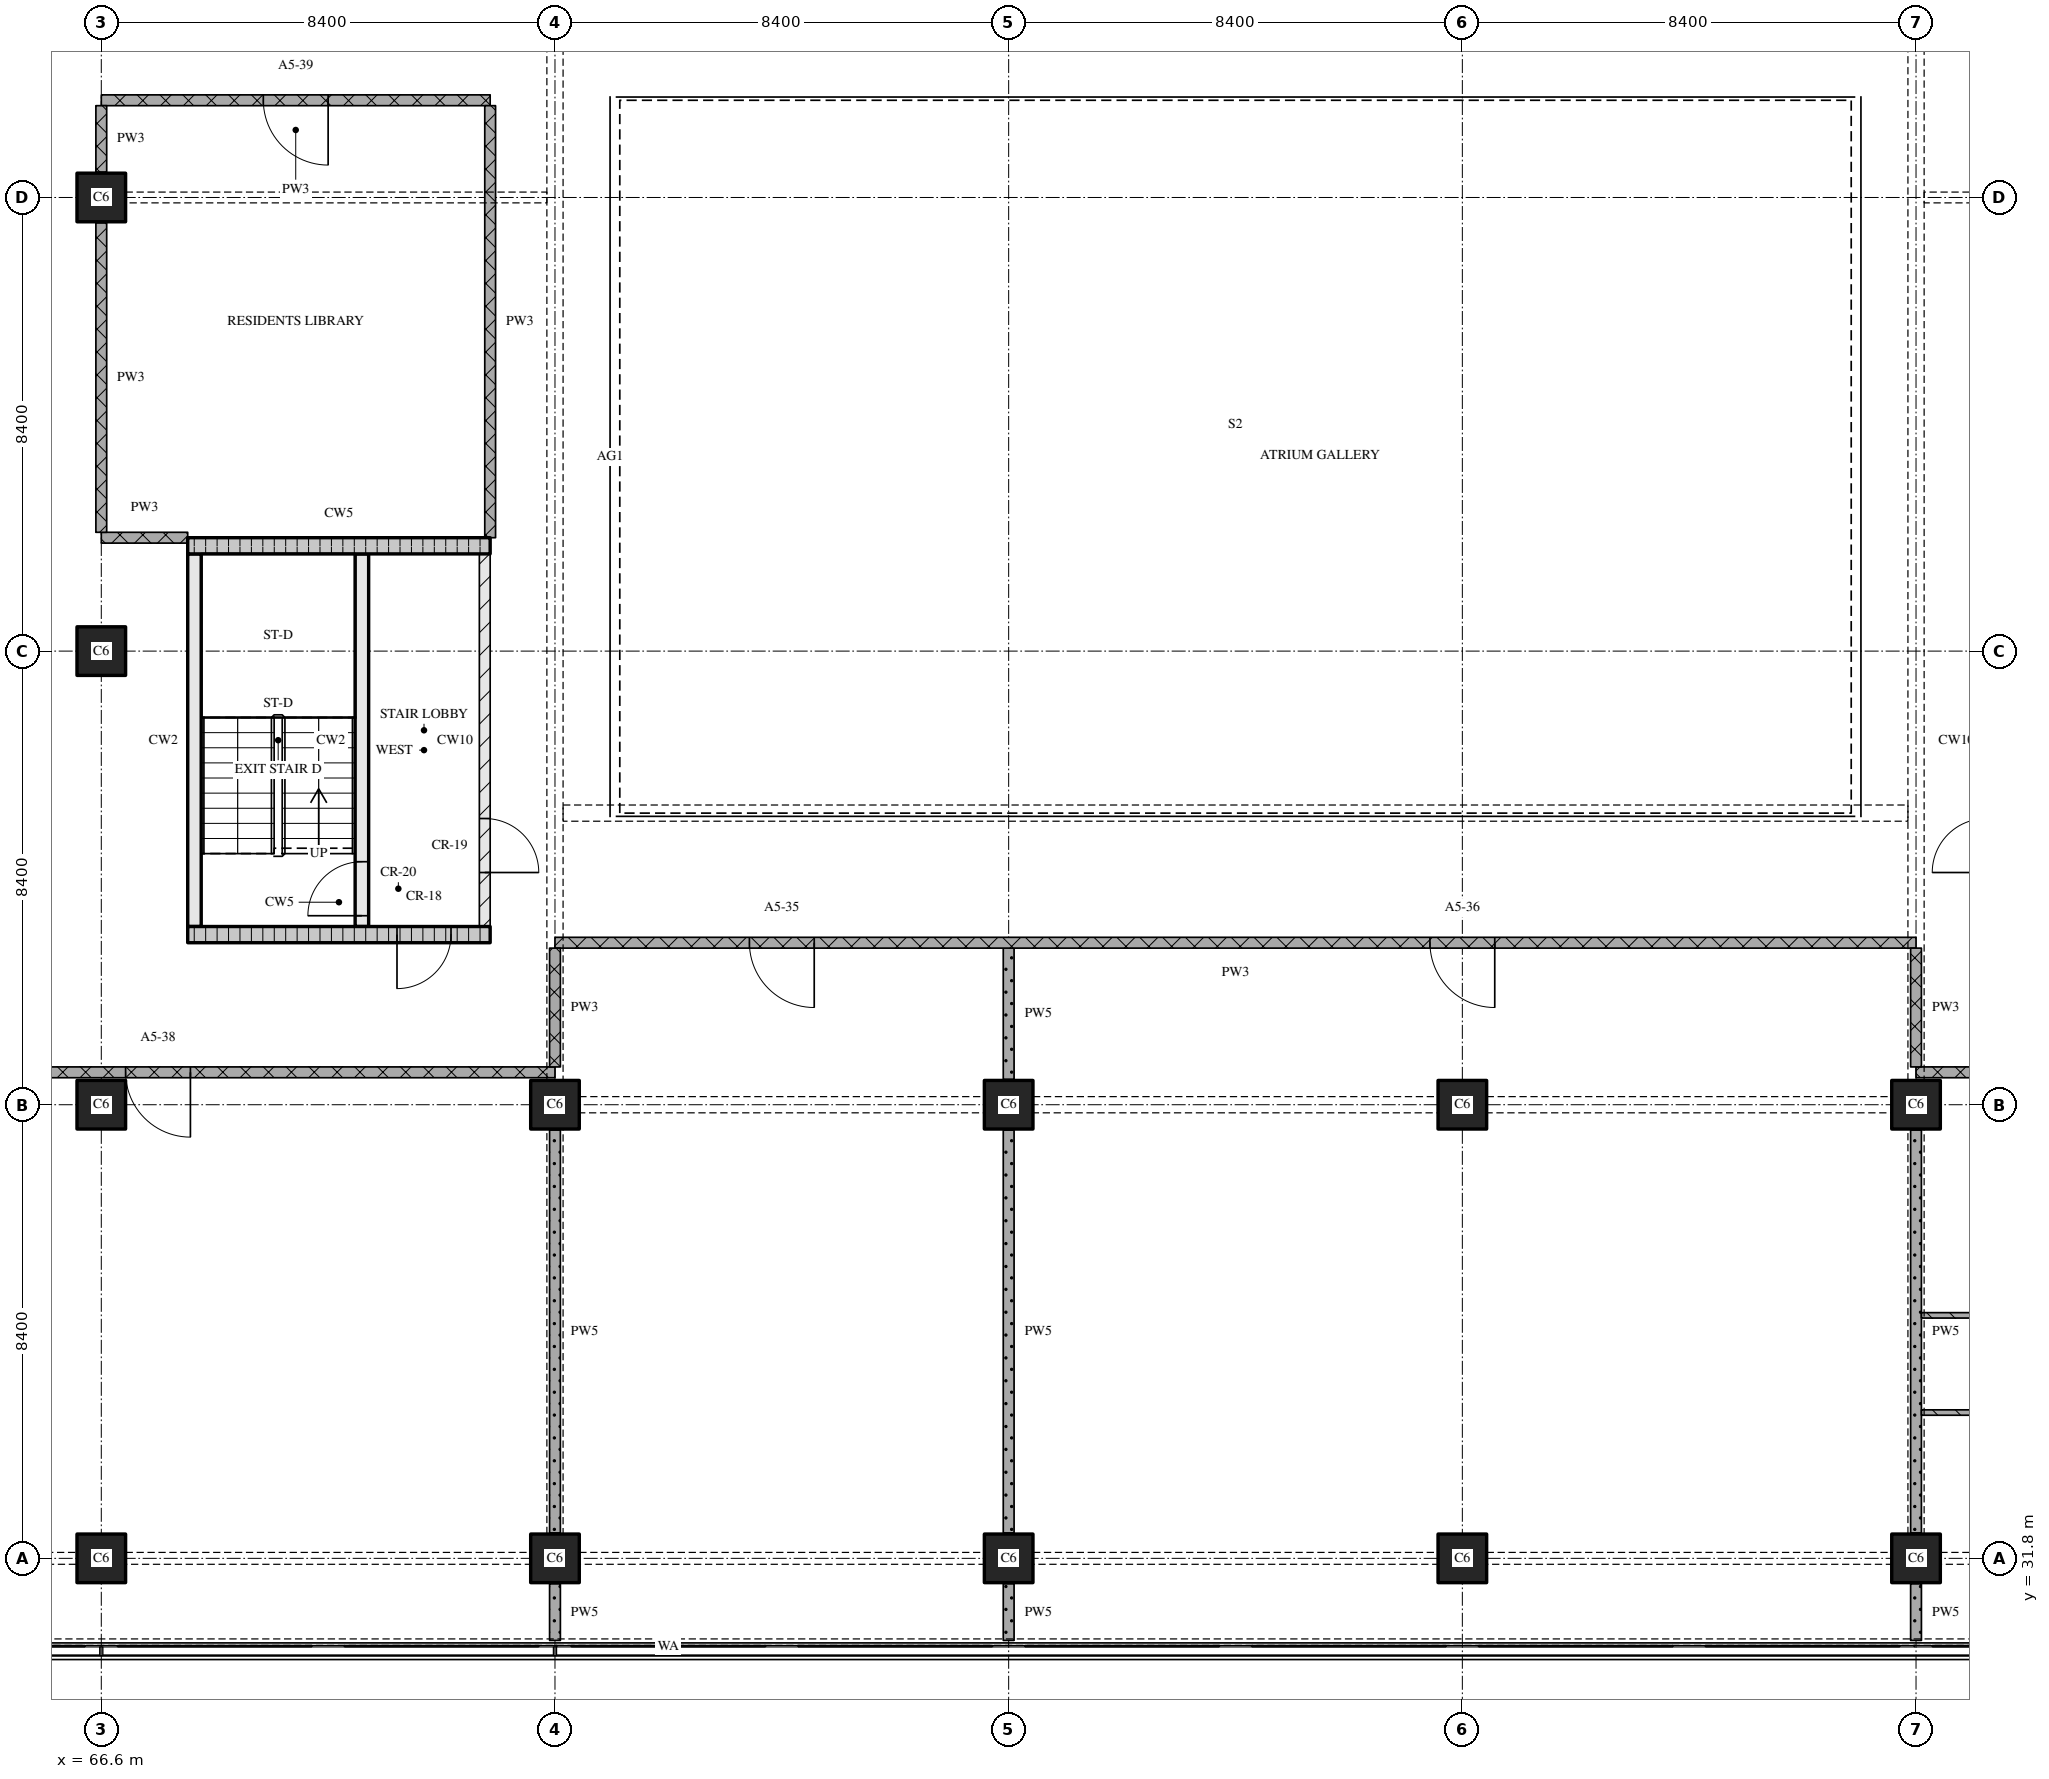
"""IFC4 building model, lengths in metres.
Left out: names, types, materials, properties, quantities, classifications, styles, units other than length and angle.
Written with IfcOpenShell. Run it as: python <this file> out.ifc"""

import sys

from ifc_helpers import new_model, si_unit, direction, frame, frame_2d, origin, origin_2d, place, context, subcontext, project, spatial, rectangle, extrude, element, fill, save


model = new_model("IFC4")
c1 = context("Model", 3, precision=1e-05, world=origin(), true_north=direction((0.0, 1.0)))
c2 = subcontext(c1, "Body", "Model", "MODEL_VIEW")
j1 = project(units=[si_unit("LENGTHUNIT", "METRE"), si_unit("PLANEANGLEUNIT", "RADIAN")], contexts=[c1])
p1 = place(None, origin())
s1 = spatial("IfcSite", under=j1, at=p1, CompositionType="ELEMENT")
p2 = place(p1, origin())
s2 = spatial("IfcBuilding", under=s1, at=p2, CompositionType="ELEMENT")
p3 = place(p2, frame((0.0, 0.0, 80.4)))
s3 = spatial("IfcBuildingStorey", under=s2, at=p3, CompositionType="ELEMENT", Elevation=80.4)
for number, where, z_axis, x_axis in (
    (1, (66.6, 31.8, 0.0), (0.0, 0.0, 1.0), (1.0, 0.0, 0.0)),
    (2, (66.6, 40.2, 0.0), (0.0, 0.0, 1.0), (1.0, 0.0, 0.0)),
    (3, (66.6, 48.6, 0.0), (0.0, 0.0, 1.0), (1.0, 0.0, 0.0)),
    (4, (66.6, 57.0, 0.0), (0.0, 0.0, 1.0), (1.0, 0.0, 0.0)),
    (5, (75.0, 31.8, 0.0), (0.0, 0.0, 1.0), (1.0, 0.0, 0.0)),
    (6, (75.0, 40.2, 0.0), (0.0, 0.0, 1.0), (1.0, 0.0, 0.0)),
    (7, (83.4, 31.8, 0.0), (0.0, 0.0, 1.0), (1.0, 0.0, 0.0)),
    (8, (83.4, 40.2, 0.0), (0.0, 0.0, 1.0), (1.0, 0.0, 0.0)),
    (9, (91.8, 31.8, 0.0), (0.0, 0.0, 1.0), (1.0, 0.0, 0.0)),
    (10, (91.8, 40.2, 0.0), (0.0, 0.0, 1.0), (1.0, 0.0, 0.0)),
    (11, (100.2, 31.8, 0.0), (0.0, 0.0, 1.0), (1.0, 0.0, 0.0)),
    (12, (100.2, 40.2, 0.0), (0.0, 0.0, 1.0), (1.0, 0.0, 0.0)),
):
    element("IfcColumn", number, at=place(p3, frame(where, z_axis=z_axis, x_axis=x_axis)), inside=s3, PredefinedType="COLUMN", context=c2, shape_type="SweptSolid", body=[
        extrude(rectangle(XDim=0.9, YDim=0.9, at=origin_2d()), origin(), (0.0, 0.0, 1.0), 3.6),
    ])
p4 = place(p3, frame((68.2, 43.35, 0.0), z_axis=(0.0, 0.0, 1.0), x_axis=(1.0, 0.0, 0.0)))
e13 = element("IfcWall", 13, at=p4, inside=s3, PredefinedType="SOLIDWALL", context=c2, shape_type="SweptSolid", body=[
    extrude(rectangle(XDim=5.6, YDim=0.3, at=frame_2d((2.8, 0.0))), origin(), (0.0, 0.0, 1.0), 3.3),
])
p5 = place(p4, frame((3.875, 0.0, 0.0)))
e14 = element("IfcOpeningElement", 14, at=p5, cuts=e13, PredefinedType="OPENING", context=c2, shape_type="SweptSolid", body=[
    extrude(rectangle(XDim=1.0, YDim=2.1, at=frame_2d((0.5, 1.05))), frame((0.0, 0.16, 0.0), z_axis=(0.0, -1.0, 0.0), x_axis=(1.0, 0.0, 0.0)), (0.0, 0.0, 1.0), 0.32),
])
p6 = place(p3, frame((68.325, 43.5, 0.0), z_axis=(0.0, 0.0, 1.0), x_axis=(0.0, 1.0, 0.0)))
e15 = element("IfcWall", 15, at=p6, inside=s3, PredefinedType="SOLIDWALL", context=c2, shape_type="SweptSolid", body=[
    extrude(rectangle(XDim=6.9, YDim=0.25, at=frame_2d((3.45, 0.0))), origin(), (0.0, 0.0, 1.0), 3.3),
])
p7 = place(p3, frame((71.425, 43.5, 0.0), z_axis=(0.0, 0.0, 1.0), x_axis=(0.0, 1.0, 0.0)))
e16 = element("IfcWall", 16, at=p7, inside=s3, PredefinedType="SOLIDWALL", context=c2, shape_type="SweptSolid", body=[
    extrude(rectangle(XDim=6.9, YDim=0.25, at=frame_2d((3.45, 0.0))), origin(), (0.0, 0.0, 1.0), 3.3),
])
p8 = place(p7, frame((0.2, 0.0, 0.0)))
e17 = element("IfcOpeningElement", 17, at=p8, cuts=e16, PredefinedType="OPENING", context=c2, shape_type="SweptSolid", body=[
    extrude(rectangle(XDim=1.0, YDim=2.1, at=frame_2d((0.5, 1.05))), frame((0.0, 0.135, 0.0), z_axis=(0.0, -1.0, 0.0), x_axis=(1.0, 0.0, 0.0)), (0.0, 0.0, 1.0), 0.27),
])
p9 = place(p3, frame((73.7, 43.5, 0.0), z_axis=(0.0, 0.0, 1.0), x_axis=(0.0, 1.0, 0.0)))
e18 = element("IfcWall", 18, at=p9, inside=s3, PredefinedType="PARTITIONING", context=c2, shape_type="SweptSolid", body=[
    extrude(rectangle(XDim=6.9, YDim=0.2, at=frame_2d((3.45, 0.0))), origin(), (0.0, 0.0, 1.0), 3.3),
])
p10 = place(p9, frame((1.0, 0.0, 0.0)))
e19 = element("IfcOpeningElement", 19, at=p10, cuts=e18, PredefinedType="OPENING", context=c2, shape_type="SweptSolid", body=[
    extrude(rectangle(XDim=1.0, YDim=2.1, at=frame_2d((0.5, 1.05))), frame((0.0, 0.11, 0.0), z_axis=(0.0, -1.0, 0.0), x_axis=(1.0, 0.0, 0.0)), (0.0, 0.0, 1.0), 0.22),
])
p11 = place(p3, frame((68.2, 50.55, 0.0), z_axis=(0.0, 0.0, 1.0), x_axis=(1.0, 0.0, 0.0)))
e20 = element("IfcWall", 20, at=p11, inside=s3, PredefinedType="SOLIDWALL", context=c2, shape_type="SweptSolid", body=[
    extrude(rectangle(XDim=5.6, YDim=0.3, at=frame_2d((2.8, 0.0))), origin(), (0.0, 0.0, 1.0), 3.3),
])
p12 = place(p3, frame((100.3, 34.5, 0.0), z_axis=(0.0, 0.0, 1.0), x_axis=(1.0, 0.0, 0.0)))
e21 = element("IfcWall", 21, at=p12, inside=s3, PredefinedType="PARTITIONING", context=c2, shape_type="SweptSolid", body=[
    extrude(rectangle(XDim=4.1, YDim=0.1, at=frame_2d((2.05, 0.0))), origin(), (0.0, 0.0, 1.0), 3.3),
])
p13 = place(p3, frame((100.3, 36.3, 0.0), z_axis=(0.0, 0.0, 1.0), x_axis=(1.0, 0.0, 0.0)))
e22 = element("IfcWall", 22, at=p13, inside=s3, PredefinedType="PARTITIONING", context=c2, shape_type="SweptSolid", body=[
    extrude(rectangle(XDim=11.0, YDim=0.1, at=frame_2d((5.5, 0.0))), origin(), (0.0, 0.0, 1.0), 3.3),
])
p14 = place(p13, frame((1.75, 0.0, 0.0)))
e23 = element("IfcOpeningElement", 23, at=p14, cuts=e22, PredefinedType="OPENING", context=c2, shape_type="SweptSolid", body=[
    extrude(rectangle(XDim=0.8, YDim=2.1, at=frame_2d((0.4, 1.05))), frame((0.0, 0.06, 0.0), z_axis=(0.0, -1.0, 0.0), x_axis=(1.0, 0.0, 0.0)), (0.0, 0.0, 1.0), 0.12),
])
p15 = place(p13, frame((6.25, 0.0, 0.0)))
e24 = element("IfcOpeningElement", 24, at=p15, cuts=e22, PredefinedType="OPENING", context=c2, shape_type="SweptSolid", body=[
    extrude(rectangle(XDim=0.8, YDim=2.1, at=frame_2d((0.4, 1.05))), frame((0.0, 0.06, 0.0), z_axis=(0.0, -1.0, 0.0), x_axis=(1.0, 0.0, 0.0)), (0.0, 0.0, 1.0), 0.12),
])
p16 = place(p3, frame((75.0, 40.8, 0.0), z_axis=(0.0, 0.0, 1.0), x_axis=(-1.0, 0.0, 0.0)))
e25 = element("IfcWall", 25, at=p16, inside=s3, PredefinedType="PARTITIONING", context=c2, shape_type="SweptSolid", body=[
    extrude(rectangle(XDim=24.08, YDim=0.2, at=frame_2d((12.04, 0.0))), origin(), (0.0, 0.0, 1.0), 3.3),
])
p17 = place(p16, frame((6.75, 0.0, 0.0)))
e26 = element("IfcOpeningElement", 26, at=p17, cuts=e25, PredefinedType="OPENING", context=c2, shape_type="SweptSolid", body=[
    extrude(rectangle(XDim=1.2, YDim=2.1, at=frame_2d((0.6, 1.05))), frame((0.0, 0.11, 0.0), z_axis=(0.0, -1.0, 0.0), x_axis=(1.0, 0.0, 0.0)), (0.0, 0.0, 1.0), 0.22),
])
p18 = place(p16, frame((20.728, 0.0, 0.0)))
e27 = element("IfcOpeningElement", 27, at=p18, cuts=e25, PredefinedType="OPENING", context=c2, shape_type="SweptSolid", body=[
    extrude(rectangle(XDim=1.2, YDim=2.1, at=frame_2d((0.6, 1.05))), frame((0.0, 0.11, 0.0), z_axis=(0.0, -1.0, 0.0), x_axis=(1.0, 0.0, 0.0)), (0.0, 0.0, 1.0), 0.22),
])
p19 = place(p3, frame((124.28, 40.8, 0.0), z_axis=(0.0, 0.0, 1.0), x_axis=(-1.0, 0.0, 0.0)))
e28 = element("IfcWall", 28, at=p19, inside=s3, PredefinedType="PARTITIONING", context=c2, shape_type="SweptSolid", body=[
    extrude(rectangle(XDim=24.08, YDim=0.2, at=frame_2d((12.04, 0.0))), origin(), (0.0, 0.0, 1.0), 3.3),
])
p20 = place(p19, frame((11.73, 0.0, 0.0)))
e29 = element("IfcOpeningElement", 29, at=p20, cuts=e28, PredefinedType="OPENING", context=c2, shape_type="SweptSolid", body=[
    extrude(rectangle(XDim=1.0, YDim=2.1, at=frame_2d((0.5, 1.05))), frame((0.0, 0.11, 0.0), z_axis=(0.0, -1.0, 0.0), x_axis=(1.0, 0.0, 0.0)), (0.0, 0.0, 1.0), 0.22),
])
p21 = place(p3, frame((100.2, 43.2, 0.0), z_axis=(0.0, 0.0, 1.0), x_axis=(-1.0, 0.0, 0.0)))
e30 = element("IfcWall", 30, at=p21, inside=s3, PredefinedType="PARTITIONING", context=c2, shape_type="SweptSolid", body=[
    extrude(rectangle(XDim=25.2, YDim=0.2, at=frame_2d((12.6, 0.0))), origin(), (0.0, 0.0, 1.0), 3.3),
])
p22 = place(p21, frame((7.8, 0.0, 0.0)))
e31 = element("IfcOpeningElement", 31, at=p22, cuts=e30, PredefinedType="OPENING", context=c2, shape_type="SweptSolid", body=[
    extrude(rectangle(XDim=1.2, YDim=2.1, at=frame_2d((0.6, 1.05))), frame((0.0, 0.11, 0.0), z_axis=(0.0, -1.0, 0.0), x_axis=(1.0, 0.0, 0.0)), (0.0, 0.0, 1.0), 0.22),
])
p23 = place(p21, frame((20.4, 0.0, 0.0)))
e32 = element("IfcOpeningElement", 32, at=p23, cuts=e30, PredefinedType="OPENING", context=c2, shape_type="SweptSolid", body=[
    extrude(rectangle(XDim=1.2, YDim=2.1, at=frame_2d((0.6, 1.05))), frame((0.0, 0.11, 0.0), z_axis=(0.0, -1.0, 0.0), x_axis=(1.0, 0.0, 0.0)), (0.0, 0.0, 1.0), 0.22),
])
p24 = place(p3, frame((66.6, 50.7, 0.0), z_axis=(0.0, 0.0, 1.0), x_axis=(1.0, 0.0, 0.0)))
e33 = element("IfcWall", 33, at=p24, inside=s3, PredefinedType="PARTITIONING", context=c2, shape_type="SweptSolid", body=[
    extrude(rectangle(XDim=1.6, YDim=0.2, at=frame_2d((0.8, 0.0))), origin(), (0.0, 0.0, 1.0), 3.3),
])
p25 = place(p3, frame((73.8, 58.8, 0.0), z_axis=(0.0, 0.0, 1.0), x_axis=(-1.0, 0.0, 0.0)))
e34 = element("IfcWall", 34, at=p25, inside=s3, PredefinedType="PARTITIONING", context=c2, shape_type="SweptSolid", body=[
    extrude(rectangle(XDim=7.2, YDim=0.2, at=frame_2d((3.6, 0.0))), origin(), (0.0, 0.0, 1.0), 3.3),
])
p26 = place(p25, frame((3.0, 0.0, 0.0)))
e35 = element("IfcOpeningElement", 35, at=p26, cuts=e34, PredefinedType="OPENING", context=c2, shape_type="SweptSolid", body=[
    extrude(rectangle(XDim=1.2, YDim=2.1, at=frame_2d((0.6, 1.05))), frame((0.0, 0.11, 0.0), z_axis=(0.0, -1.0, 0.0), x_axis=(1.0, 0.0, 0.0)), (0.0, 0.0, 1.0), 0.22),
])
p27 = place(p3, frame((66.6, 56.53, 0.0), z_axis=(0.0, 0.0, 1.0), x_axis=(0.0, -1.0, 0.0)))
e36 = element("IfcWall", 36, at=p27, inside=s3, PredefinedType="PARTITIONING", context=c2, shape_type="SweptSolid", body=[
    extrude(rectangle(XDim=5.73, YDim=0.2, at=frame_2d((2.865, 0.0))), origin(), (0.0, 0.0, 1.0), 3.3),
])
p28 = place(p3, frame((66.6, 58.7, 0.0), z_axis=(0.0, 0.0, 1.0), x_axis=(0.0, -1.0, 0.0)))
e37 = element("IfcWall", 37, at=p28, inside=s3, PredefinedType="PARTITIONING", context=c2, shape_type="SweptSolid", body=[
    extrude(rectangle(XDim=1.23, YDim=0.2, at=frame_2d((0.615, 0.0))), origin(), (0.0, 0.0, 1.0), 3.3),
])
p29 = place(p3, frame((73.8, 58.7, 0.0), z_axis=(0.0, 0.0, 1.0), x_axis=(0.0, -1.0, 0.0)))
e38 = element("IfcWall", 38, at=p29, inside=s3, PredefinedType="PARTITIONING", context=c2, shape_type="SweptSolid", body=[
    extrude(rectangle(XDim=8.0, YDim=0.2, at=frame_2d((4.0, 0.0))), origin(), (0.0, 0.0, 1.0), 3.3),
])
p30 = place(p3, frame((75.0, 43.1, 0.0), z_axis=(0.0, 0.0, 1.0), x_axis=(0.0, -1.0, 0.0)))
e39 = element("IfcWall", 39, at=p30, inside=s3, PredefinedType="PARTITIONING", context=c2, shape_type="SweptSolid", body=[
    extrude(rectangle(XDim=2.2, YDim=0.2, at=frame_2d((1.1, 0.0))), origin(), (0.0, 0.0, 1.0), 2.41),
])
p31 = place(p3, frame((75.0, 31.33, 0.0), z_axis=(0.0, 0.0, 1.0), x_axis=(0.0, -1.0, 0.0)))
e40 = element("IfcWall", 40, at=p31, inside=s3, PredefinedType="PARTITIONING", context=c2, shape_type="SweptSolid", body=[
    extrude(rectangle(XDim=1.05, YDim=0.2, at=frame_2d((0.525, 0.0))), origin(), (0.0, 0.0, 1.0), 2.41),
])
p32 = place(p3, frame((75.0, 39.73, 0.0), z_axis=(0.0, 0.0, 1.0), x_axis=(0.0, -1.0, 0.0)))
e41 = element("IfcWall", 41, at=p32, inside=s3, PredefinedType="PARTITIONING", context=c2, shape_type="SweptSolid", body=[
    extrude(rectangle(XDim=7.46, YDim=0.2, at=frame_2d((3.73, 0.0))), origin(), (0.0, 0.0, 1.0), 2.81),
])
p33 = place(p3, frame((83.4, 31.33, 0.0), z_axis=(0.0, 0.0, 1.0), x_axis=(0.0, -1.0, 0.0)))
e42 = element("IfcWall", 42, at=p33, inside=s3, PredefinedType="PARTITIONING", context=c2, shape_type="SweptSolid", body=[
    extrude(rectangle(XDim=1.05, YDim=0.2, at=frame_2d((0.525, 0.0))), origin(), (0.0, 0.0, 1.0), 3.3),
])
p34 = place(p3, frame((83.4, 39.73, 0.0), z_axis=(0.0, 0.0, 1.0), x_axis=(0.0, -1.0, 0.0)))
e43 = element("IfcWall", 43, at=p34, inside=s3, PredefinedType="PARTITIONING", context=c2, shape_type="SweptSolid", body=[
    extrude(rectangle(XDim=7.46, YDim=0.2, at=frame_2d((3.73, 0.0))), origin(), (0.0, 0.0, 1.0), 3.3),
])
p35 = place(p3, frame((83.4, 43.1, 0.0), z_axis=(0.0, 0.0, 1.0), x_axis=(0.0, -1.0, 0.0)))
e44 = element("IfcWall", 44, at=p35, inside=s3, PredefinedType="PARTITIONING", context=c2, shape_type="SweptSolid", body=[
    extrude(rectangle(XDim=2.43, YDim=0.2, at=frame_2d((1.215, 0.0))), origin(), (0.0, 0.0, 1.0), 3.3),
])
p36 = place(p3, frame((100.2, 43.1, 0.0), z_axis=(0.0, 0.0, 1.0), x_axis=(0.0, -1.0, 0.0)))
e45 = element("IfcWall", 45, at=p36, inside=s3, PredefinedType="PARTITIONING", context=c2, shape_type="SweptSolid", body=[
    extrude(rectangle(XDim=2.2, YDim=0.2, at=frame_2d((1.1, 0.0))), origin(), (0.0, 0.0, 1.0), 2.41),
])
p37 = place(p3, frame((100.2, 31.33, 0.0), z_axis=(0.0, 0.0, 1.0), x_axis=(0.0, -1.0, 0.0)))
e46 = element("IfcWall", 46, at=p37, inside=s3, PredefinedType="PARTITIONING", context=c2, shape_type="SweptSolid", body=[
    extrude(rectangle(XDim=1.05, YDim=0.2, at=frame_2d((0.525, 0.0))), origin(), (0.0, 0.0, 1.0), 2.41),
])
p38 = place(p3, frame((100.2, 39.73, 0.0), z_axis=(0.0, 0.0, 1.0), x_axis=(0.0, -1.0, 0.0)))
e47 = element("IfcWall", 47, at=p38, inside=s3, PredefinedType="PARTITIONING", context=c2, shape_type="SweptSolid", body=[
    extrude(rectangle(XDim=7.46, YDim=0.2, at=frame_2d((3.73, 0.0))), origin(), (0.0, 0.0, 1.0), 2.81),
])
p39 = place(p5, origin())
e48 = element("IfcDoor", 48, at=p39, inside=s3, OperationType="SINGLE_SWING_RIGHT", PredefinedType="DOOR", context=c2, shape_type="SweptSolid", body=[
    extrude(rectangle(XDim=1.0, YDim=2.1, at=frame_2d((0.5, 1.05))), frame((0.0, 0.025, 0.0), z_axis=(0.0, -1.0, 0.0), x_axis=(1.0, 0.0, 0.0)), (0.0, 0.0, 1.0), 0.05),
])
fill(e14, e48)
p40 = place(p8, origin())
e49 = element("IfcDoor", 49, at=p40, inside=s3, OperationType="SINGLE_SWING_LEFT", PredefinedType="DOOR", context=c2, shape_type="SweptSolid", body=[
    extrude(rectangle(XDim=1.0, YDim=2.1, at=frame_2d((0.5, 1.05))), frame((0.0, 0.025, 0.0), z_axis=(0.0, -1.0, 0.0), x_axis=(1.0, 0.0, 0.0)), (0.0, 0.0, 1.0), 0.05),
])
fill(e17, e49)
p41 = place(p10, origin())
e50 = element("IfcDoor", 50, at=p41, inside=s3, OperationType="SINGLE_SWING_RIGHT", PredefinedType="DOOR", context=c2, shape_type="SweptSolid", body=[
    extrude(rectangle(XDim=1.0, YDim=2.1, at=frame_2d((0.5, 1.05))), frame((0.0, 0.025, 0.0), z_axis=(0.0, -1.0, 0.0), x_axis=(1.0, 0.0, 0.0)), (0.0, 0.0, 1.0), 0.05),
])
fill(e19, e50)
p42 = place(p17, origin())
e51 = element("IfcDoor", 51, at=p42, inside=s3, OperationType="SINGLE_SWING_LEFT", PredefinedType="DOOR", context=c2, shape_type="SweptSolid", body=[
    extrude(rectangle(XDim=1.2, YDim=2.1, at=frame_2d((0.6, 1.05))), frame((0.0, 0.025, 0.0), z_axis=(0.0, -1.0, 0.0), x_axis=(1.0, 0.0, 0.0)), (0.0, 0.0, 1.0), 0.05),
])
fill(e26, e51)
p43 = place(p22, origin())
e52 = element("IfcDoor", 52, at=p43, inside=s3, OperationType="SINGLE_SWING_LEFT", PredefinedType="DOOR", context=c2, shape_type="SweptSolid", body=[
    extrude(rectangle(XDim=1.2, YDim=2.1, at=frame_2d((0.6, 1.05))), frame((0.0, 0.025, 0.0), z_axis=(0.0, -1.0, 0.0), x_axis=(1.0, 0.0, 0.0)), (0.0, 0.0, 1.0), 0.05),
])
fill(e31, e52)
p44 = place(p23, origin())
e53 = element("IfcDoor", 53, at=p44, inside=s3, OperationType="SINGLE_SWING_LEFT", PredefinedType="DOOR", context=c2, shape_type="SweptSolid", body=[
    extrude(rectangle(XDim=1.2, YDim=2.1, at=frame_2d((0.6, 1.05))), frame((0.0, 0.025, 0.0), z_axis=(0.0, -1.0, 0.0), x_axis=(1.0, 0.0, 0.0)), (0.0, 0.0, 1.0), 0.05),
])
fill(e32, e53)
p45 = place(p26, origin())
e54 = element("IfcDoor", 54, at=p45, inside=s3, OperationType="SINGLE_SWING_LEFT", PredefinedType="DOOR", context=c2, shape_type="SweptSolid", body=[
    extrude(rectangle(XDim=1.2, YDim=2.1, at=frame_2d((0.6, 1.05))), frame((0.0, 0.025, 0.0), z_axis=(0.0, -1.0, 0.0), x_axis=(1.0, 0.0, 0.0)), (0.0, 0.0, 1.0), 0.05),
])
fill(e35, e54)
save(model, sys.argv[1])
